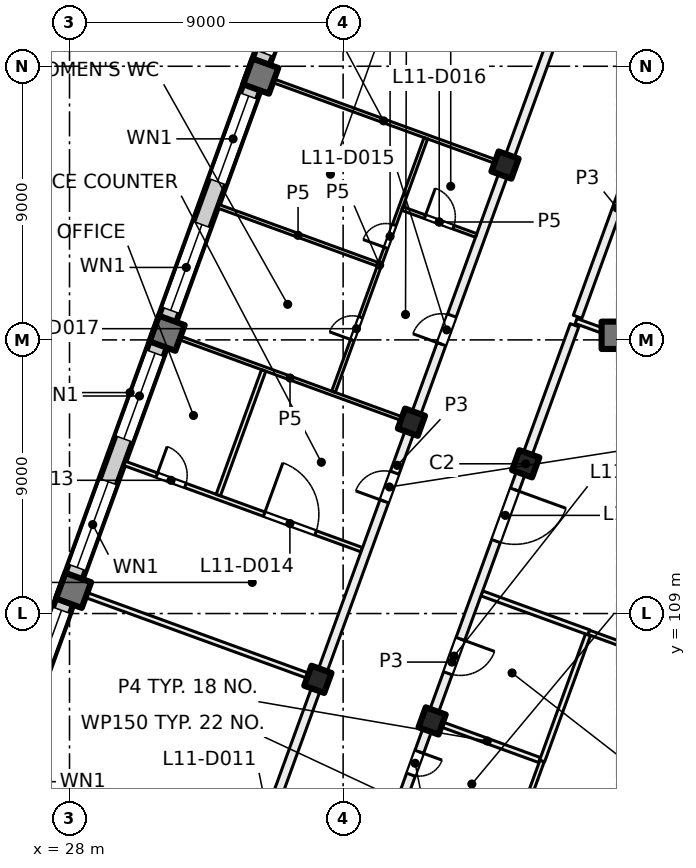
"""IFC4 building model, lengths in metres.
Left out: names, types, materials, properties, quantities, classifications, styles, units other than length and angle.
Written with IfcOpenShell. Run it as: python <this file> out.ifc"""

import sys

from ifc_helpers import new_model, si_unit, direction, frame, frame_2d, origin, origin_2d, place, context, subcontext, project, spatial, rectangle, extrude, element, fill, save


model = new_model("IFC4")
c1 = context("Model", 3, precision=1e-05, world=origin(), true_north=direction((0.0, 1.0)))
c2 = subcontext(c1, "Body", "Model", "MODEL_VIEW")
j1 = project(units=[si_unit("LENGTHUNIT", "METRE"), si_unit("PLANEANGLEUNIT", "RADIAN")], contexts=[c1])
p1 = place(None, origin())
s1 = spatial("IfcSite", under=j1, at=p1, CompositionType="ELEMENT")
p2 = place(p1, origin())
s2 = spatial("IfcBuilding", under=s1, at=p2, CompositionType="ELEMENT")
p3 = place(p2, frame((0.0, 0.0, 51.5)))
s3 = spatial("IfcBuildingStorey", under=s2, at=p3, CompositionType="ELEMENT", Elevation=51.5)
p4 = place(p3, frame((45.952, 118.152, 0.0), z_axis=(0.0, 0.0, 1.0), x_axis=(1.0, 0.0, 0.0)))
e1 = element("IfcColumn", 1, at=p4, inside=s3, PredefinedType="COLUMN", context=c2, shape_type="SweptSolid", body=[
    extrude(rectangle(XDim=0.9, YDim=0.9, at=origin_2d()), origin(), (0.0, 0.0, 1.0), 4.0),
])
for number, where, z_axis, x_axis in (
    (2, (43.006, 113.925, 0.0), (0.0, 0.0, 1.0), (-0.342, -0.94, 0.0)),
    (3, (39.927, 105.468, 0.0), (0.0, 0.0, 1.0), (-0.342, -0.94, 0.0)),
    (4, (42.325, 123.751, 0.0), (0.0, 0.0, 1.0), (-0.342, -0.94, 0.0)),
    (5, (39.247, 115.293, 0.0), (0.0, 0.0, 1.0), (-0.342, -0.94, 0.0)),
    (6, (36.169, 106.836, 0.0), (0.0, 0.0, 1.0), (-0.342, -0.94, 0.0)),
):
    element("IfcColumn", number, at=place(p3, frame(where, z_axis=z_axis, x_axis=x_axis)), inside=s3, PredefinedType="COLUMN", context=c2, shape_type="SweptSolid", body=[
        extrude(rectangle(XDim=0.7, YDim=0.7, at=origin_2d()), origin(), (0.0, 0.0, 1.0), 4.0),
    ])
for number, where, z_axis, x_axis in (
    (7, (34.291, 126.675, 0.0), (0.0, 0.0, 1.0), (-0.342, -0.94, 0.0)),
    (8, (31.212, 118.218, 0.0), (0.0, 0.0, 1.0), (-0.342, -0.94, 0.0)),
    (9, (28.134, 109.76, 0.0), (0.0, 0.0, 1.0), (-0.342, -0.94, 0.0)),
):
    element("IfcColumn", number, at=place(p3, frame(where, z_axis=z_axis, x_axis=x_axis)), inside=s3, PredefinedType="COLUMN", context=c2, shape_type="SweptSolid", body=[
        extrude(rectangle(XDim=0.9, YDim=0.9, at=origin_2d()), origin(), (0.0, 0.0, 1.0), 4.0),
    ])
p5 = place(p3, frame((52.212, 113.783, 0.0), z_axis=(0.0, 0.0, 1.0), x_axis=(-0.34202521188, -0.939690775968, 0.0)))
e10 = element("IfcWall", 10, at=p5, inside=s3, PredefinedType="SOLIDWALL", context=c2, shape_type="SweptSolid", body=[
    extrude(rectangle(XDim=21.745, YDim=0.6, at=frame_2d((10.873, 0.0))), origin(), (0.0, 0.0, 1.0), 3.625),
])
p6 = place(p5, frame((3.765, 0.0, 0.9)))
e11 = element("IfcOpeningElement", 11, at=p6, cuts=e10, PredefinedType="OPENING", context=c2, shape_type="SweptSolid", body=[
    extrude(rectangle(XDim=3.0, YDim=2.4, at=frame_2d((1.5, 1.2))), frame((0.0, 0.31, 0.0), z_axis=(0.0, -1.0, 0.0), x_axis=(1.0, 0.0, 0.0)), (0.0, 0.0, 1.0), 0.62),
])
p7 = place(p5, frame((8.265, 0.0, 0.9)))
e12 = element("IfcOpeningElement", 12, at=p7, cuts=e10, PredefinedType="OPENING", context=c2, shape_type="SweptSolid", body=[
    extrude(rectangle(XDim=3.0, YDim=2.4, at=frame_2d((1.5, 1.2))), frame((0.0, 0.31, 0.0), z_axis=(0.0, -1.0, 0.0), x_axis=(1.0, 0.0, 0.0)), (0.0, 0.0, 1.0), 0.62),
])
p8 = place(p5, frame((12.765, 0.0, 0.9)))
e13 = element("IfcOpeningElement", 13, at=p8, cuts=e10, PredefinedType="OPENING", context=c2, shape_type="SweptSolid", body=[
    extrude(rectangle(XDim=3.0, YDim=2.4, at=frame_2d((1.5, 1.2))), frame((0.0, 0.31, 0.0), z_axis=(0.0, -1.0, 0.0), x_axis=(1.0, 0.0, 0.0)), (0.0, 0.0, 1.0), 0.62),
])
p9 = place(p5, frame((17.265, 0.0, 0.9)))
e14 = element("IfcOpeningElement", 14, at=p9, cuts=e10, PredefinedType="OPENING", context=c2, shape_type="SweptSolid", body=[
    extrude(rectangle(XDim=3.0, YDim=2.4, at=frame_2d((1.5, 1.2))), frame((0.0, 0.31, 0.0), z_axis=(0.0, -1.0, 0.0), x_axis=(1.0, 0.0, 0.0)), (0.0, 0.0, 1.0), 0.62),
])
p10 = place(p3, frame((24.666, 100.669, 0.0), z_axis=(0.0, 0.0, 1.0), x_axis=(0.34201964167, 0.939692803373, 0.0)))
e15 = element("IfcWall", 15, at=p10, inside=s3, PredefinedType="SOLIDWALL", context=c2, shape_type="SweptSolid", body=[
    extrude(rectangle(XDim=32.884, YDim=0.6, at=frame_2d((16.442, 0.0))), origin(), (0.0, 0.0, 1.0), 3.625),
])
p11 = place(p10, frame((1.48, 0.0, 0.9)))
e16 = element("IfcOpeningElement", 16, at=p11, cuts=e15, PredefinedType="OPENING", context=c2, shape_type="SweptSolid", body=[
    extrude(rectangle(XDim=3.0, YDim=2.4, at=frame_2d((1.5, 1.2))), frame((0.0, 0.31, 0.0), z_axis=(0.0, -1.0, 0.0), x_axis=(1.0, 0.0, 0.0)), (0.0, 0.0, 1.0), 0.62),
])
p12 = place(p10, frame((5.98, 0.0, 0.9)))
e17 = element("IfcOpeningElement", 17, at=p12, cuts=e15, PredefinedType="OPENING", context=c2, shape_type="SweptSolid", body=[
    extrude(rectangle(XDim=3.0, YDim=2.4, at=frame_2d((1.5, 1.2))), frame((0.0, 0.31, 0.0), z_axis=(0.0, -1.0, 0.0), x_axis=(1.0, 0.0, 0.0)), (0.0, 0.0, 1.0), 0.62),
])
p13 = place(p10, frame((10.48, 0.0, 0.9)))
e18 = element("IfcOpeningElement", 18, at=p13, cuts=e15, PredefinedType="OPENING", context=c2, shape_type="SweptSolid", body=[
    extrude(rectangle(XDim=3.0, YDim=2.4, at=frame_2d((1.5, 1.2))), frame((0.0, 0.31, 0.0), z_axis=(0.0, -1.0, 0.0), x_axis=(1.0, 0.0, 0.0)), (0.0, 0.0, 1.0), 0.62),
])
p14 = place(p10, frame((14.98, 0.0, 0.9)))
e19 = element("IfcOpeningElement", 19, at=p14, cuts=e15, PredefinedType="OPENING", context=c2, shape_type="SweptSolid", body=[
    extrude(rectangle(XDim=3.0, YDim=2.4, at=frame_2d((1.5, 1.2))), frame((0.0, 0.31, 0.0), z_axis=(0.0, -1.0, 0.0), x_axis=(1.0, 0.0, 0.0)), (0.0, 0.0, 1.0), 0.62),
])
p15 = place(p10, frame((19.48, 0.0, 0.9)))
e20 = element("IfcOpeningElement", 20, at=p15, cuts=e15, PredefinedType="OPENING", context=c2, shape_type="SweptSolid", body=[
    extrude(rectangle(XDim=3.0, YDim=2.4, at=frame_2d((1.5, 1.2))), frame((0.0, 0.31, 0.0), z_axis=(0.0, -1.0, 0.0), x_axis=(1.0, 0.0, 0.0)), (0.0, 0.0, 1.0), 0.62),
])
p16 = place(p10, frame((23.98, 0.0, 0.9)))
e21 = element("IfcOpeningElement", 21, at=p16, cuts=e15, PredefinedType="OPENING", context=c2, shape_type="SweptSolid", body=[
    extrude(rectangle(XDim=3.0, YDim=2.4, at=frame_2d((1.5, 1.2))), frame((0.0, 0.31, 0.0), z_axis=(0.0, -1.0, 0.0), x_axis=(1.0, 0.0, 0.0)), (0.0, 0.0, 1.0), 0.62),
])
p17 = place(p10, frame((28.48, 0.0, 0.9)))
e22 = element("IfcOpeningElement", 22, at=p17, cuts=e15, PredefinedType="OPENING", context=c2, shape_type="SweptSolid", body=[
    extrude(rectangle(XDim=3.0, YDim=2.4, at=frame_2d((1.5, 1.2))), frame((0.0, 0.31, 0.0), z_axis=(0.0, -1.0, 0.0), x_axis=(1.0, 0.0, 0.0)), (0.0, 0.0, 1.0), 0.62),
])
p18 = place(p3, frame((28.275, 109.709, 0.0), z_axis=(0.0, 0.0, 1.0), x_axis=(0.939697205528, -0.342007546586, 0.0)))
e23 = element("IfcWall", 23, at=p18, inside=s3, PredefinedType="PARTITIONING", context=c2, shape_type="SweptSolid", body=[
    extrude(rectangle(XDim=8.301, YDim=0.175, at=frame_2d((4.15, 0.0))), origin(), (0.0, 0.0, 1.0), 3.625),
])
p19 = place(p3, frame((29.814, 113.938, 0.0), z_axis=(0.0, 0.0, 1.0), x_axis=(0.939697205528, -0.342007546586, 0.0)))
e24 = element("IfcWall", 24, at=p19, inside=s3, PredefinedType="PARTITIONING", context=c2, shape_type="SweptSolid", body=[
    extrude(rectangle(XDim=8.301, YDim=0.15, at=frame_2d((4.15, 0.0))), origin(), (0.0, 0.0, 1.0), 3.625),
])
p20 = place(p19, frame((1.125, 0.0, 0.0)))
e25 = element("IfcOpeningElement", 25, at=p20, cuts=e24, PredefinedType="OPENING", context=c2, shape_type="SweptSolid", body=[
    extrude(rectangle(XDim=1.0, YDim=2.1, at=frame_2d((0.5, 1.05))), frame((0.0, 0.085, 0.0), z_axis=(0.0, -1.0, 0.0), x_axis=(1.0, 0.0, 0.0)), (0.0, 0.0, 1.0), 0.17),
])
p21 = place(p19, frame((4.884, 0.0, 0.0)))
e26 = element("IfcOpeningElement", 26, at=p21, cuts=e24, PredefinedType="OPENING", context=c2, shape_type="SweptSolid", body=[
    extrude(rectangle(XDim=1.8, YDim=2.1, at=frame_2d((0.9, 1.05))), frame((0.0, 0.085, 0.0), z_axis=(0.0, -1.0, 0.0), x_axis=(1.0, 0.0, 0.0)), (0.0, 0.0, 1.0), 0.17),
])
p22 = place(p3, frame((31.353, 118.166, 0.0), z_axis=(0.0, 0.0, 1.0), x_axis=(0.939687752599, -0.342033518263, 0.0)))
e27 = element("IfcWall", 27, at=p22, inside=s3, PredefinedType="PARTITIONING", context=c2, shape_type="SweptSolid", body=[
    extrude(rectangle(XDim=8.301, YDim=0.125, at=frame_2d((4.15, 0.0))), origin(), (0.0, 0.0, 1.0), 3.625),
])
p23 = place(p3, frame((32.881, 97.657, 0.0), z_axis=(0.0, 0.0, 1.0), x_axis=(0.342017360004, 0.939693633828, 0.0)))
e28 = element("IfcWall", 28, at=p23, inside=s3, PredefinedType="PARTITIONING", context=c2, shape_type="SweptSolid", body=[
    extrude(rectangle(XDim=34.516, YDim=0.3, at=frame_2d((17.258, 0.0))), origin(), (0.0, 0.0, 1.0), 3.625),
])
p24 = place(p23, frame((4.275, 0.0, 0.0)))
e29 = element("IfcOpeningElement", 29, at=p24, cuts=e28, PredefinedType="OPENING", context=c2, shape_type="SweptSolid", body=[
    extrude(rectangle(XDim=1.2, YDim=2.1, at=frame_2d((0.6, 1.05))), frame((0.0, 0.16, 0.0), z_axis=(0.0, -1.0, 0.0), x_axis=(1.0, 0.0, 0.0)), (0.0, 0.0, 1.0), 0.32),
])
p25 = place(p23, frame((16.0, 0.0, 0.0)))
e30 = element("IfcOpeningElement", 30, at=p25, cuts=e28, PredefinedType="OPENING", context=c2, shape_type="SweptSolid", body=[
    extrude(rectangle(XDim=1.0, YDim=2.1, at=frame_2d((0.5, 1.05))), frame((0.0, 0.16, 0.0), z_axis=(0.0, -1.0, 0.0), x_axis=(1.0, 0.0, 0.0)), (0.0, 0.0, 1.0), 0.32),
])
p26 = place(p23, frame((21.5, 0.0, 0.0)))
e31 = element("IfcOpeningElement", 31, at=p26, cuts=e28, PredefinedType="OPENING", context=c2, shape_type="SweptSolid", body=[
    extrude(rectangle(XDim=1.0, YDim=2.1, at=frame_2d((0.5, 1.05))), frame((0.0, 0.16, 0.0), z_axis=(0.0, -1.0, 0.0), x_axis=(1.0, 0.0, 0.0)), (0.0, 0.0, 1.0), 0.32),
])
p27 = place(p3, frame((34.386, 116.996, 0.0), z_axis=(0.0, 0.0, 1.0), x_axis=(-0.341945230853, -0.939719883315, 0.0)))
e32 = element("IfcWall", 32, at=p27, inside=s3, PredefinedType="PARTITIONING", context=c2, shape_type="SweptSolid", body=[
    extrude(rectangle(XDim=4.363, YDim=0.15, at=frame_2d((2.182, 0.0))), origin(), (0.0, 0.0, 1.0), 3.625),
])
p28 = place(p3, frame((34.431, 126.624, 0.0), z_axis=(0.0, 0.0, 1.0), x_axis=(0.939687752599, -0.342033518263, 0.0)))
e33 = element("IfcWall", 33, at=p28, inside=s3, PredefinedType="PARTITIONING", context=c2, shape_type="SweptSolid", body=[
    extrude(rectangle(XDim=8.301, YDim=0.125, at=frame_2d((4.15, 0.0))), origin(), (0.0, 0.0, 1.0), 3.625),
])
p29 = place(p3, frame((36.684, 116.293, 0.0), z_axis=(0.0, 0.0, 1.0), x_axis=(0.342089829483, 0.939667254173, 0.0)))
e34 = element("IfcWall", 34, at=p29, inside=s3, PredefinedType="PARTITIONING", context=c2, shape_type="SweptSolid", body=[
    extrude(rectangle(XDim=8.875, YDim=0.125, at=frame_2d((4.437, 0.0))), origin(), (0.0, 0.0, 1.0), 3.625),
])
p30 = place(p29, frame((1.809, 0.0, 0.0)))
e35 = element("IfcOpeningElement", 35, at=p30, cuts=e34, PredefinedType="OPENING", context=c2, shape_type="SweptSolid", body=[
    extrude(rectangle(XDim=0.8, YDim=2.1, at=frame_2d((0.4, 1.05))), frame((0.0, 0.073, 0.0), z_axis=(0.0, -1.0, 0.0), x_axis=(1.0, 0.0, 0.0)), (0.0, 0.0, 1.0), 0.145),
])
p31 = place(p29, frame((5.039, 0.0, 0.0)))
e36 = element("IfcOpeningElement", 36, at=p31, cuts=e34, PredefinedType="OPENING", context=c2, shape_type="SweptSolid", body=[
    extrude(rectangle(XDim=0.8, YDim=2.1, at=frame_2d((0.4, 1.05))), frame((0.0, 0.073, 0.0), z_axis=(0.0, -1.0, 0.0), x_axis=(1.0, 0.0, 0.0)), (0.0, 0.0, 1.0), 0.145),
])
p32 = place(p3, frame((38.143, 120.484, 0.0), z_axis=(0.0, 0.0, 1.0), x_axis=(-0.939696437289, 0.342009657388, 0.0)))
e37 = element("IfcWall", 37, at=p32, inside=s3, PredefinedType="PARTITIONING", context=c2, shape_type="SweptSolid", body=[
    extrude(rectangle(XDim=5.588, YDim=0.125, at=frame_2d((2.794, 0.0))), origin(), (0.0, 0.0, 1.0), 3.625),
])
p33 = place(p3, frame((41.561, 109.663, 0.0), z_axis=(0.0, 0.0, 1.0), x_axis=(0.939610777088, -0.34224492338, 0.0)))
e38 = element("IfcWall", 38, at=p33, inside=s3, PredefinedType="PARTITIONING", context=c2, shape_type="SweptSolid", body=[
    extrude(rectangle(XDim=3.749, YDim=0.175, at=frame_2d((1.875, 0.0))), origin(), (0.0, 0.0, 1.0), 3.625),
])
p34 = place(p3, frame((38.945, 122.321, 0.0), z_axis=(0.0, 0.0, 1.0), x_axis=(0.939542462288, -0.342432418966, 0.0)))
e39 = element("IfcWall", 39, at=p34, inside=s3, PredefinedType="PARTITIONING", context=c2, shape_type="SweptSolid", body=[
    extrude(rectangle(XDim=2.587, YDim=0.125, at=frame_2d((1.294, 0.0))), origin(), (0.0, 0.0, 1.0), 3.625),
])
p35 = place(p34, frame((0.794, 0.0, 0.0)))
e40 = element("IfcOpeningElement", 40, at=p35, cuts=e39, PredefinedType="OPENING", context=c2, shape_type="SweptSolid", body=[
    extrude(rectangle(XDim=1.0, YDim=2.1, at=frame_2d((0.5, 1.05))), frame((0.0, 0.073, 0.0), z_axis=(0.0, -1.0, 0.0), x_axis=(1.0, 0.0, 0.0)), (0.0, 0.0, 1.0), 0.145),
])
p36 = place(p3, frame((43.463, 104.181, 0.0), z_axis=(0.0, 0.0, 1.0), x_axis=(-0.939655178262, 0.342122998299, 0.0)))
e41 = element("IfcWall", 41, at=p36, inside=s3, PredefinedType="PARTITIONING", context=c2, shape_type="SweptSolid", body=[
    extrude(rectangle(XDim=3.663, YDim=0.175, at=frame_2d((1.832, 0.0))), origin(), (0.0, 0.0, 1.0), 3.625),
])
p37 = place(p3, frame((43.545, 104.151, 0.0), z_axis=(0.0, 0.0, 1.0), x_axis=(-0.341877092744, -0.93974467461, 0.0)))
e42 = element("IfcWall", 42, at=p37, inside=s3, PredefinedType="PARTITIONING", context=c2, shape_type="SweptSolid", body=[
    extrude(rectangle(XDim=2.925, YDim=0.15, at=frame_2d((1.462, 0.0))), origin(), (0.0, 0.0, 1.0), 3.625),
])
p38 = place(p3, frame((52.965, 115.598, 0.0), z_axis=(0.0, 0.0, 1.0), x_axis=(-0.939650555598, 0.342135694374, 0.0)))
e43 = element("IfcWall", 43, at=p38, inside=s3, PredefinedType="PARTITIONING", context=c2, shape_type="SweptSolid", body=[
    extrude(rectangle(XDim=8.836, YDim=0.175, at=frame_2d((4.418, 0.0))), origin(), (0.0, 0.0, 1.0), 3.625),
])
p39 = place(p38, frame((3.818, 0.0, 0.0)))
e44 = element("IfcOpeningElement", 44, at=p39, cuts=e43, PredefinedType="OPENING", context=c2, shape_type="SweptSolid", body=[
    extrude(rectangle(XDim=1.2, YDim=2.1, at=frame_2d((0.6, 1.05))), frame((0.0, 0.097, 0.0), z_axis=(0.0, -1.0, 0.0), x_axis=(1.0, 0.0, 0.0)), (0.0, 0.0, 1.0), 0.195),
])
p40 = place(p3, frame((44.612, 118.483, 0.0), z_axis=(0.0, 0.0, 1.0), x_axis=(-0.342043123066, -0.939684256526, 0.0)))
e45 = element("IfcWall", 45, at=p40, inside=s3, PredefinedType="PARTITIONING", context=c2, shape_type="SweptSolid", body=[
    extrude(rectangle(XDim=23.582, YDim=0.3, at=frame_2d((11.791, 0.0))), origin(), (0.0, 0.0, 1.0), 3.625),
])
p41 = place(p40, frame((14.932, 0.0, 0.0)))
e46 = element("IfcOpeningElement", 46, at=p41, cuts=e45, PredefinedType="OPENING", context=c2, shape_type="SweptSolid", body=[
    extrude(rectangle(XDim=0.8, YDim=2.1, at=frame_2d((0.4, 1.05))), frame((0.0, 0.16, 0.0), z_axis=(0.0, -1.0, 0.0), x_axis=(1.0, 0.0, 0.0)), (0.0, 0.0, 1.0), 0.32),
])
p42 = place(p40, frame((10.982, 0.0, 0.0)))
e47 = element("IfcOpeningElement", 47, at=p42, cuts=e45, PredefinedType="OPENING", context=c2, shape_type="SweptSolid", body=[
    extrude(rectangle(XDim=1.2, YDim=2.1, at=frame_2d((0.6, 1.05))), frame((0.0, 0.16, 0.0), z_axis=(0.0, -1.0, 0.0), x_axis=(1.0, 0.0, 0.0)), (0.0, 0.0, 1.0), 0.32),
])
p43 = place(p40, frame((19.307, 0.0, 0.0)))
e48 = element("IfcOpeningElement", 48, at=p43, cuts=e45, PredefinedType="OPENING", context=c2, shape_type="SweptSolid", body=[
    extrude(rectangle(XDim=1.8, YDim=2.1, at=frame_2d((0.9, 1.05))), frame((0.0, 0.16, 0.0), z_axis=(0.0, -1.0, 0.0), x_axis=(1.0, 0.0, 0.0)), (0.0, 0.0, 1.0), 0.32),
])
p44 = place(p40, frame((5.756, 0.0, 0.0)))
e49 = element("IfcOpeningElement", 49, at=p44, cuts=e45, PredefinedType="OPENING", context=c2, shape_type="SweptSolid", body=[
    extrude(rectangle(XDim=1.8, YDim=2.1, at=frame_2d((0.9, 1.05))), frame((0.0, 0.16, 0.0), z_axis=(0.0, -1.0, 0.0), x_axis=(1.0, 0.0, 0.0)), (0.0, 0.0, 1.0), 0.32),
])
p45 = place(p3, frame((45.054, 108.298, 0.0), z_axis=(0.0, 0.0, 1.0), x_axis=(-0.34193405199, -0.939723951004, 0.0)))
e50 = element("IfcWall", 50, at=p45, inside=s3, PredefinedType="PARTITIONING", context=c2, shape_type="SweptSolid", body=[
    extrude(rectangle(XDim=4.413, YDim=0.175, at=frame_2d((2.207, 0.0))), origin(), (0.0, 0.0, 1.0), 3.625),
])
p46 = place(p3, frame((45.084, 108.38, 0.0), z_axis=(0.0, 0.0, 1.0), x_axis=(0.93972604571, -0.341928295136, 0.0)))
e51 = element("IfcWall", 51, at=p46, inside=s3, PredefinedType="PARTITIONING", context=c2, shape_type="SweptSolid", body=[
    extrude(rectangle(XDim=4.55, YDim=0.15, at=frame_2d((2.275, 0.0))), origin(), (0.0, 0.0, 1.0), 3.625),
])
p47 = place(p3, frame((47.314, 125.909, 0.0), z_axis=(0.0, 0.0, 1.0), x_axis=(-0.34198522802, -0.939705328183, 0.0)))
e52 = element("IfcWall", 52, at=p47, inside=s3, PredefinedType="PARTITIONING", context=c2, shape_type="SweptSolid", body=[
    extrude(rectangle(XDim=7.609, YDim=0.3, at=frame_2d((3.804, 0.0))), origin(), (0.0, 0.0, 1.0), 3.625),
])
p48 = place(p12, origin())
e53 = element("IfcWindow", 53, at=p48, inside=s3, PartitioningType="SINGLE_PANEL", PredefinedType="WINDOW", context=c2, shape_type="SweptSolid", body=[
    extrude(rectangle(XDim=3.0, YDim=2.4, at=frame_2d((1.5, 1.2))), frame((0.0, 0.03, 0.0), z_axis=(0.0, -1.0, 0.0), x_axis=(1.0, 0.0, 0.0)), (0.0, 0.0, 1.0), 0.06),
])
fill(e17, e53)
p49 = place(p13, origin())
e54 = element("IfcWindow", 54, at=p49, inside=s3, PartitioningType="SINGLE_PANEL", PredefinedType="WINDOW", context=c2, shape_type="SweptSolid", body=[
    extrude(rectangle(XDim=3.0, YDim=2.4, at=frame_2d((1.5, 1.2))), frame((0.0, 0.03, 0.0), z_axis=(0.0, -1.0, 0.0), x_axis=(1.0, 0.0, 0.0)), (0.0, 0.0, 1.0), 0.06),
])
fill(e18, e54)
p50 = place(p14, origin())
e55 = element("IfcWindow", 55, at=p50, inside=s3, PartitioningType="SINGLE_PANEL", PredefinedType="WINDOW", context=c2, shape_type="SweptSolid", body=[
    extrude(rectangle(XDim=3.0, YDim=2.4, at=frame_2d((1.5, 1.2))), frame((0.0, 0.03, 0.0), z_axis=(0.0, -1.0, 0.0), x_axis=(1.0, 0.0, 0.0)), (0.0, 0.0, 1.0), 0.06),
])
fill(e19, e55)
p51 = place(p15, origin())
e56 = element("IfcWindow", 56, at=p51, inside=s3, PartitioningType="SINGLE_PANEL", PredefinedType="WINDOW", context=c2, shape_type="SweptSolid", body=[
    extrude(rectangle(XDim=3.0, YDim=2.4, at=frame_2d((1.5, 1.2))), frame((0.0, 0.03, 0.0), z_axis=(0.0, -1.0, 0.0), x_axis=(1.0, 0.0, 0.0)), (0.0, 0.0, 1.0), 0.06),
])
fill(e20, e56)
p52 = place(p16, origin())
e57 = element("IfcWindow", 57, at=p52, inside=s3, PartitioningType="SINGLE_PANEL", PredefinedType="WINDOW", context=c2, shape_type="SweptSolid", body=[
    extrude(rectangle(XDim=3.0, YDim=2.4, at=frame_2d((1.5, 1.2))), frame((0.0, 0.03, 0.0), z_axis=(0.0, -1.0, 0.0), x_axis=(1.0, 0.0, 0.0)), (0.0, 0.0, 1.0), 0.06),
])
fill(e21, e57)
p53 = place(p17, origin())
e58 = element("IfcWindow", 58, at=p53, inside=s3, PartitioningType="SINGLE_PANEL", PredefinedType="WINDOW", context=c2, shape_type="SweptSolid", body=[
    extrude(rectangle(XDim=3.0, YDim=2.4, at=frame_2d((1.5, 1.2))), frame((0.0, 0.03, 0.0), z_axis=(0.0, -1.0, 0.0), x_axis=(1.0, 0.0, 0.0)), (0.0, 0.0, 1.0), 0.06),
])
fill(e22, e58)
p54 = place(p25, origin())
e59 = element("IfcDoor", 59, at=p54, inside=s3, OperationType="SINGLE_SWING_LEFT", PredefinedType="DOOR", context=c2, shape_type="SweptSolid", body=[
    extrude(rectangle(XDim=1.0, YDim=2.1, at=frame_2d((0.5, 1.05))), frame((0.0, 0.025, 0.0), z_axis=(0.0, -1.0, 0.0), x_axis=(1.0, 0.0, 0.0)), (0.0, 0.0, 1.0), 0.05),
])
fill(e30, e59)
p55 = place(p20, origin())
e60 = element("IfcDoor", 60, at=p55, inside=s3, OperationType="SINGLE_SWING_RIGHT", PredefinedType="DOOR", context=c2, shape_type="SweptSolid", body=[
    extrude(rectangle(XDim=1.0, YDim=2.1, at=frame_2d((0.5, 1.05))), frame((0.0, 0.025, 0.0), z_axis=(0.0, -1.0, 0.0), x_axis=(1.0, 0.0, 0.0)), (0.0, 0.0, 1.0), 0.05),
])
fill(e25, e60)
p56 = place(p21, origin())
e61 = element("IfcDoor", 61, at=p56, inside=s3, OperationType="DOUBLE_DOOR_SINGLE_SWING", PredefinedType="DOOR", context=c2, shape_type="SweptSolid", body=[
    extrude(rectangle(XDim=1.8, YDim=2.1, at=frame_2d((0.9, 1.05))), frame((0.0, 0.025, 0.0), z_axis=(0.0, -1.0, 0.0), x_axis=(1.0, 0.0, 0.0)), (0.0, 0.0, 1.0), 0.05),
])
fill(e26, e61)
p57 = place(p26, origin())
e62 = element("IfcDoor", 62, at=p57, inside=s3, OperationType="SINGLE_SWING_LEFT", PredefinedType="DOOR", context=c2, shape_type="SweptSolid", body=[
    extrude(rectangle(XDim=1.0, YDim=2.1, at=frame_2d((0.5, 1.05))), frame((0.0, 0.025, 0.0), z_axis=(0.0, -1.0, 0.0), x_axis=(1.0, 0.0, 0.0)), (0.0, 0.0, 1.0), 0.05),
])
fill(e31, e62)
p58 = place(p35, origin())
e63 = element("IfcDoor", 63, at=p58, inside=s3, OperationType="SINGLE_SWING_LEFT", PredefinedType="DOOR", context=c2, shape_type="SweptSolid", body=[
    extrude(rectangle(XDim=1.0, YDim=2.1, at=frame_2d((0.5, 1.05))), frame((0.0, 0.025, 0.0), z_axis=(0.0, -1.0, 0.0), x_axis=(1.0, 0.0, 0.0)), (0.0, 0.0, 1.0), 0.05),
])
fill(e40, e63)
p59 = place(p30, origin())
e64 = element("IfcDoor", 64, at=p59, inside=s3, OperationType="SINGLE_SWING_RIGHT", PredefinedType="DOOR", context=c2, shape_type="SweptSolid", body=[
    extrude(rectangle(XDim=0.8, YDim=2.1, at=frame_2d((0.4, 1.05))), frame((0.0, 0.025, 0.0), z_axis=(0.0, -1.0, 0.0), x_axis=(1.0, 0.0, 0.0)), (0.0, 0.0, 1.0), 0.05),
])
fill(e35, e64)
p60 = place(p31, origin())
e65 = element("IfcDoor", 65, at=p60, inside=s3, OperationType="SINGLE_SWING_LEFT", PredefinedType="DOOR", context=c2, shape_type="SweptSolid", body=[
    extrude(rectangle(XDim=0.8, YDim=2.1, at=frame_2d((0.4, 1.05))), frame((0.0, 0.025, 0.0), z_axis=(0.0, -1.0, 0.0), x_axis=(1.0, 0.0, 0.0)), (0.0, 0.0, 1.0), 0.05),
])
fill(e36, e65)
p61 = place(p41, origin())
e66 = element("IfcDoor", 66, at=p61, inside=s3, OperationType="SINGLE_SWING_LEFT", PredefinedType="DOOR", context=c2, shape_type="SweptSolid", body=[
    extrude(rectangle(XDim=0.8, YDim=2.1, at=frame_2d((0.4, 1.05))), frame((0.0, 0.025, 0.0), z_axis=(0.0, -1.0, 0.0), x_axis=(1.0, 0.0, 0.0)), (0.0, 0.0, 1.0), 0.05),
])
fill(e46, e66)
p62 = place(p42, origin())
e67 = element("IfcDoor", 67, at=p62, inside=s3, OperationType="DOUBLE_DOOR_SINGLE_SWING", PredefinedType="DOOR", context=c2, shape_type="SweptSolid", body=[
    extrude(rectangle(XDim=1.2, YDim=2.1, at=frame_2d((0.6, 1.05))), frame((0.0, 0.025, 0.0), z_axis=(0.0, -1.0, 0.0), x_axis=(1.0, 0.0, 0.0)), (0.0, 0.0, 1.0), 0.05),
])
fill(e47, e67)
p63 = place(p44, origin())
e68 = element("IfcDoor", 68, at=p63, inside=s3, OperationType="DOUBLE_DOOR_SINGLE_SWING", PredefinedType="DOOR", context=c2, shape_type="SweptSolid", body=[
    extrude(rectangle(XDim=1.8, YDim=2.1, at=frame_2d((0.9, 1.05))), frame((0.0, 0.025, 0.0), z_axis=(0.0, -1.0, 0.0), x_axis=(1.0, 0.0, 0.0)), (0.0, 0.0, 1.0), 0.05),
])
fill(e49, e68)
save(model, sys.argv[1])
